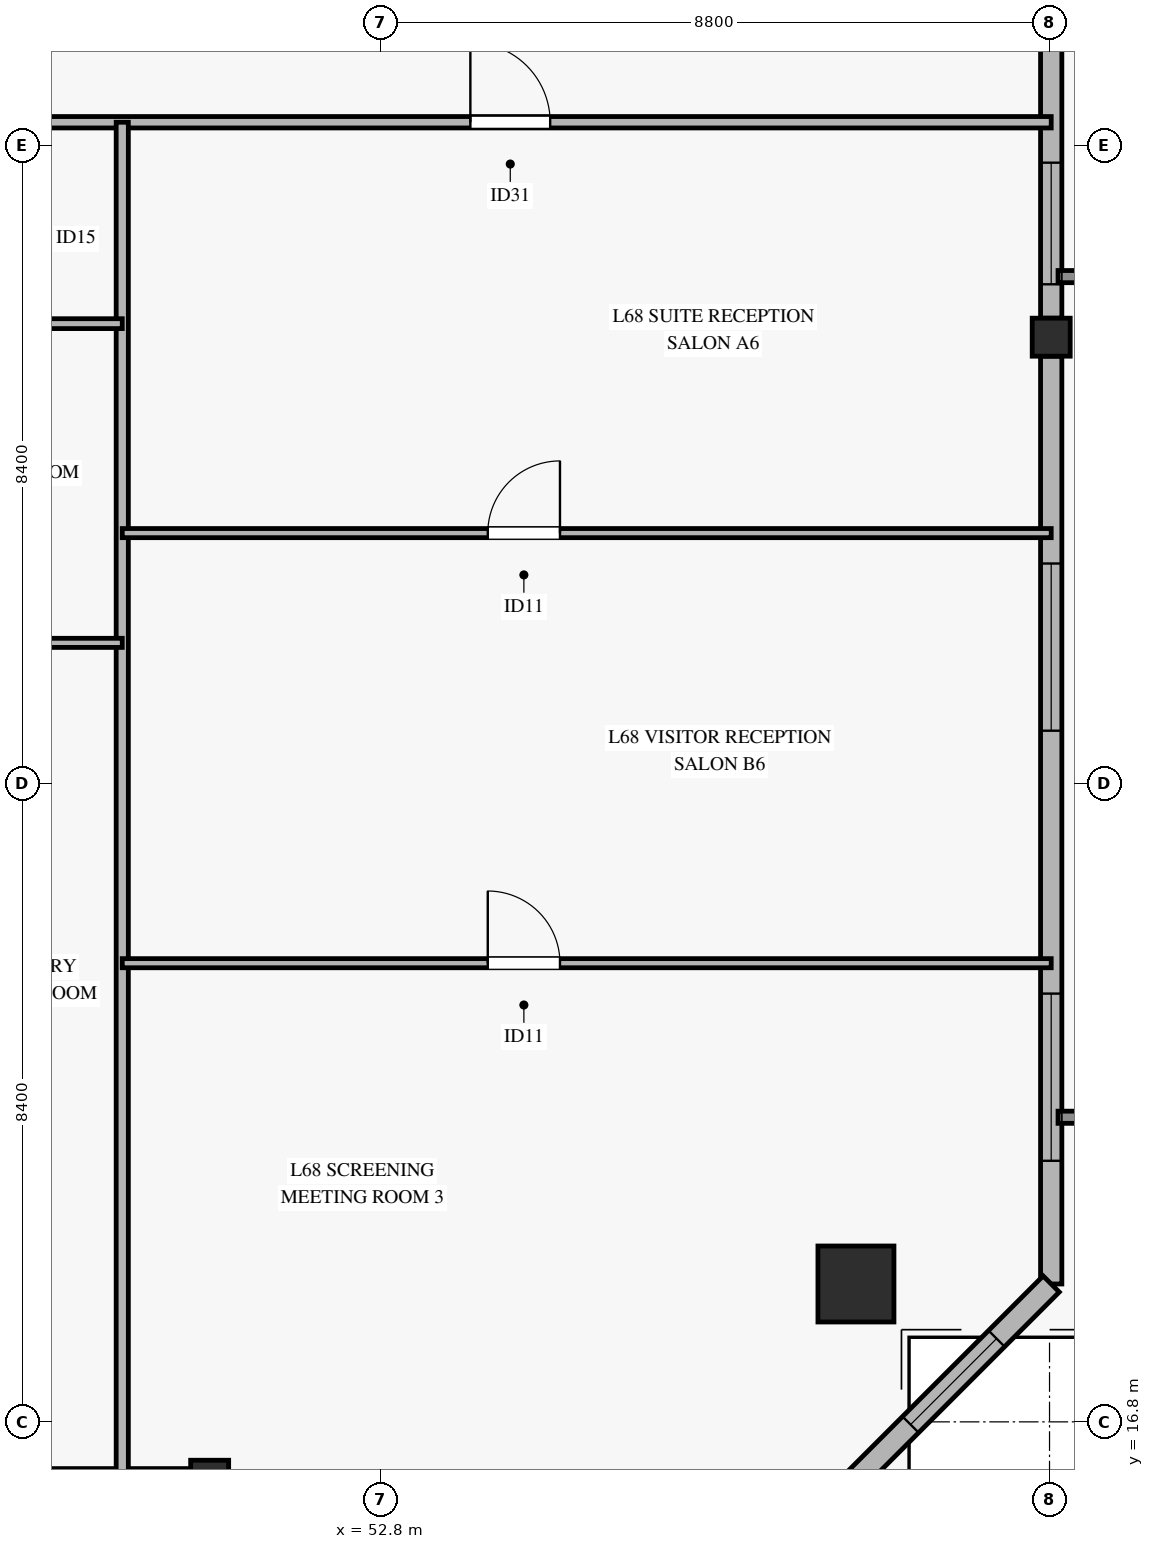
"""IFC4 building model, lengths in metres.
Left out: names, types, materials, properties, quantities, classifications, styles, units other than length and angle.
Written with IfcOpenShell. Run it as: python <this file> out.ifc"""

import sys

from ifc_helpers import new_model, si_unit, direction, frame, frame_2d, origin, origin_2d, place, context, subcontext, project, spatial, rectangle, hollow_rectangle, extrude, source, transform, mapped, element, fill, save


model = new_model("IFC4")
c1 = context("Model", 3, precision=1e-05, world=origin(), true_north=direction((0.0, 1.0)))
c2 = subcontext(c1, "Body", "Model", "MODEL_VIEW")
j1 = project(units=[si_unit("LENGTHUNIT", "METRE"), si_unit("PLANEANGLEUNIT", "RADIAN")], contexts=[c1])
p1 = place(None, origin())
s1 = spatial("IfcSite", under=j1, at=p1, CompositionType="ELEMENT")
p2 = place(p1, origin())
s2 = spatial("IfcBuilding", under=s1, at=p2, CompositionType="ELEMENT")
p3 = place(p2, frame((0.0, 0.0, 265.5)))
s3 = spatial("IfcBuildingStorey", under=s2, at=p3, CompositionType="ELEMENT", Elevation=265.5)
m1 = source(origin(), c2, "Body", "SweptSolid", [
    extrude(hollow_rectangle(XDim=1.0, YDim=1.0, WallThickness=0.045, at=origin_2d()), origin(), (0.0, 0.0, 1.0), 3.326),
])
p4 = place(p3, frame((59.053, 18.614, 0.0), z_axis=(-0.110904687369, 0.266068492199, 0.957552979098), x_axis=(-0.923024180924, -0.384741941345, 0.0)))
e1 = element("IfcColumn", 1, at=p4, inside=s3, PredefinedType="COLUMN", context=c2, shape_type="MappedRepresentation", body=[
    mapped(m1, transform((0.0, 0.0, 0.0), x_axis=(1.0, 0.0, 0.0), y_axis=(0.0, 1.0, 0.0), z_axis=(0.0, 0.0, 1.0), scale=1.0)),
])
m2 = source(origin(), c2, "Body", "SweptSolid", [
    extrude(hollow_rectangle(XDim=0.5, YDim=0.5, WallThickness=0.024, at=origin_2d()), origin(), (0.0, 0.0, 1.0), 3.318),
])
p5 = place(p3, frame((50.55, 16.045, 0.0), z_axis=(0.0, 0.280604531731, 0.959823471672), x_axis=(-1.0, 0.0, 0.0)))
e2 = element("IfcColumn", 2, at=p5, inside=s3, PredefinedType="COLUMN", context=c2, shape_type="MappedRepresentation", body=[
    mapped(m2, transform((0.0, 0.0, 0.0), x_axis=(1.0, 0.0, 0.0), y_axis=(0.0, 1.0, 0.0), z_axis=(0.0, 0.0, 1.0), scale=1.0)),
])
m3 = source(origin(), c2, "Body", "SweptSolid", [
    extrude(hollow_rectangle(XDim=0.5, YDim=0.5, WallThickness=0.024, at=origin_2d()), origin(), (0.0, 0.0, 1.0), 3.246),
])
p6 = place(p3, frame((61.622, 31.072, 0.0), z_axis=(-0.127876528395, 0.143597819239, 0.981339523201), x_axis=(-0.746804669772, -0.665043446104, 0.0)))
e3 = element("IfcColumn", 3, at=p6, inside=s3, PredefinedType="COLUMN", context=c2, shape_type="MappedRepresentation", body=[
    mapped(m3, transform((0.0, 0.0, 0.0), x_axis=(1.0, 0.0, 0.0), y_axis=(0.0, 1.0, 0.0), z_axis=(0.0, 0.0, 1.0), scale=1.0)),
])
p7 = place(p3, frame((44.55, 16.045, 0.0), z_axis=(0.0, 0.0, 1.0), x_axis=(1.0, 0.0, 0.0)))
e4 = element("IfcWall", 4, at=p7, inside=s3, PredefinedType="SOLIDWALL", context=c2, shape_type="SweptSolid", body=[
    extrude(rectangle(XDim=5.75, YDim=0.28, at=frame_2d((2.875, 0.0))), origin(), (0.0, 0.0, 1.0), 2.815),
])
p8 = place(p7, frame((1.95, 0.0, 0.0)))
e5 = element("IfcOpeningElement", 5, at=p8, cuts=e4, PredefinedType="OPENING", context=c2, shape_type="SweptSolid", body=[
    extrude(rectangle(XDim=1.8, YDim=2.25, at=frame_2d((0.9, 1.125))), frame((0.0, 0.15, 0.0), z_axis=(0.0, -1.0, 0.0), x_axis=(1.0, 0.0, 0.0)), (0.0, 0.0, 1.0), 0.3),
])
p9 = place(p3, frame((61.622, 18.614, 0.0), z_axis=(0.0, 0.0, 1.0), x_axis=(0.0, 1.0, 0.0)))
e6 = element("IfcWall", 6, at=p9, inside=s3, PredefinedType="SOLIDWALL", context=c2, shape_type="SweptSolid", body=[
    extrude(rectangle(XDim=12.208, YDim=0.28, at=frame_2d((6.104, 0.0))), origin(), (0.0, 0.0, 1.0), 2.815),
])
p10 = place(p9, frame((1.621, 0.0, 0.45)))
e7 = element("IfcOpeningElement", 7, at=p10, cuts=e6, PredefinedType="OPENING", context=c2, shape_type="SweptSolid", body=[
    extrude(rectangle(XDim=2.2, YDim=2.1, at=frame_2d((1.1, 1.05))), frame((0.0, 0.15, 0.0), z_axis=(0.0, -1.0, 0.0), x_axis=(1.0, 0.0, 0.0)), (0.0, 0.0, 1.0), 0.3),
])
p11 = place(p9, frame((7.28, 0.0, 0.45)))
e8 = element("IfcOpeningElement", 8, at=p11, cuts=e6, PredefinedType="OPENING", context=c2, shape_type="SweptSolid", body=[
    extrude(rectangle(XDim=2.2, YDim=2.1, at=frame_2d((1.1, 1.05))), frame((0.0, 0.15, 0.0), z_axis=(0.0, -1.0, 0.0), x_axis=(1.0, 0.0, 0.0)), (0.0, 0.0, 1.0), 0.3),
])
p12 = place(p3, frame((61.622, 31.322, 0.0), z_axis=(0.0, 0.0, 1.0), x_axis=(0.0, 1.0, 0.0)))
e9 = element("IfcWall", 9, at=p12, inside=s3, PredefinedType="SOLIDWALL", context=c2, shape_type="SweptSolid", body=[
    extrude(rectangle(XDim=12.208, YDim=0.28, at=frame_2d((6.104, 0.0))), origin(), (0.0, 0.0, 1.0), 2.815),
])
p13 = place(p12, frame((0.446, 0.0, 0.45)))
e10 = element("IfcOpeningElement", 10, at=p13, cuts=e9, PredefinedType="OPENING", context=c2, shape_type="SweptSolid", body=[
    extrude(rectangle(XDim=1.6, YDim=2.0, at=frame_2d((0.8, 1.0))), frame((0.0, 0.15, 0.0), z_axis=(0.0, -1.0, 0.0), x_axis=(1.0, 0.0, 0.0)), (0.0, 0.0, 1.0), 0.3),
])
p14 = place(p3, frame((59.053, 16.045, 0.0), z_axis=(0.0, 0.0, 1.0), x_axis=(0.707106781187, 0.707106781187, 0.0)))
e11 = element("IfcWall", 11, at=p14, inside=s3, PredefinedType="SOLIDWALL", context=c2, shape_type="SweptSolid", body=[
    extrude(rectangle(XDim=3.633, YDim=0.3, at=frame_2d((1.817, 0.0))), origin(), (0.0, 0.0, 1.0), 2.815),
])
p15 = place(p14, frame((1.017, 0.0, 0.45)))
e12 = element("IfcOpeningElement", 12, at=p15, cuts=e11, PredefinedType="OPENING", context=c2, shape_type="SweptSolid", body=[
    extrude(rectangle(XDim=1.6, YDim=2.0, at=frame_2d((0.8, 1.0))), frame((0.0, 0.16, 0.0), z_axis=(0.0, -1.0, 0.0), x_axis=(1.0, 0.0, 0.0)), (0.0, 0.0, 1.0), 0.32),
])
p16 = place(p3, frame((8.779, 33.9, 0.0), z_axis=(0.0, 0.0, 1.0), x_axis=(1.0, 0.0, 0.0)))
e13 = element("IfcWall", 13, at=p16, inside=s3, PredefinedType="PARTITIONING", context=c2, shape_type="SweptSolid", body=[
    extrude(rectangle(XDim=52.843, YDim=0.15, at=frame_2d((26.421, 0.0))), origin(), (0.0, 0.0, 1.0), 2.47),
])
p17 = place(p16, frame((6.144, 0.0, 0.0)))
e14 = element("IfcOpeningElement", 14, at=p17, cuts=e13, PredefinedType="OPENING", context=c2, shape_type="SweptSolid", body=[
    extrude(rectangle(XDim=1.05, YDim=2.15, at=frame_2d((0.525, 1.075))), frame((0.0, 0.085, 0.0), z_axis=(0.0, -1.0, 0.0), x_axis=(1.0, 0.0, 0.0)), (0.0, 0.0, 1.0), 0.17),
])
p18 = place(p16, frame((17.646, 0.0, 0.0)))
e15 = element("IfcOpeningElement", 15, at=p18, cuts=e13, PredefinedType="OPENING", context=c2, shape_type="SweptSolid", body=[
    extrude(rectangle(XDim=1.05, YDim=2.15, at=frame_2d((0.525, 1.075))), frame((0.0, 0.085, 0.0), z_axis=(0.0, -1.0, 0.0), x_axis=(1.0, 0.0, 0.0)), (0.0, 0.0, 1.0), 0.17),
])
p19 = place(p16, frame((24.174, 0.0, 0.0)))
e16 = element("IfcOpeningElement", 16, at=p19, cuts=e13, PredefinedType="OPENING", context=c2, shape_type="SweptSolid", body=[
    extrude(rectangle(XDim=1.05, YDim=2.15, at=frame_2d((0.525, 1.075))), frame((0.0, 0.085, 0.0), z_axis=(0.0, -1.0, 0.0), x_axis=(1.0, 0.0, 0.0)), (0.0, 0.0, 1.0), 0.17),
])
p20 = place(p16, frame((31.096, 0.0, 0.0)))
e17 = element("IfcOpeningElement", 17, at=p20, cuts=e13, PredefinedType="OPENING", context=c2, shape_type="SweptSolid", body=[
    extrude(rectangle(XDim=1.05, YDim=2.15, at=frame_2d((0.525, 1.075))), frame((0.0, 0.085, 0.0), z_axis=(0.0, -1.0, 0.0), x_axis=(1.0, 0.0, 0.0)), (0.0, 0.0, 1.0), 0.17),
])
p21 = place(p16, frame((37.241, 0.0, 0.0)))
e18 = element("IfcOpeningElement", 18, at=p21, cuts=e13, PredefinedType="OPENING", context=c2, shape_type="SweptSolid", body=[
    extrude(rectangle(XDim=1.05, YDim=2.15, at=frame_2d((0.525, 1.075))), frame((0.0, 0.085, 0.0), z_axis=(0.0, -1.0, 0.0), x_axis=(1.0, 0.0, 0.0)), (0.0, 0.0, 1.0), 0.17),
])
p22 = place(p16, frame((45.201, 0.0, 0.0)))
e19 = element("IfcOpeningElement", 19, at=p22, cuts=e13, PredefinedType="OPENING", context=c2, shape_type="SweptSolid", body=[
    extrude(rectangle(XDim=1.05, YDim=2.15, at=frame_2d((0.525, 1.075))), frame((0.0, 0.085, 0.0), z_axis=(0.0, -1.0, 0.0), x_axis=(1.0, 0.0, 0.0)), (0.0, 0.0, 1.0), 0.17),
])
p23 = place(p3, frame((49.4, 16.045, 0.0), z_axis=(0.0, 0.0, 1.0), x_axis=(0.0, 1.0, 0.0)))
e20 = element("IfcWall", 20, at=p23, inside=s3, PredefinedType="PARTITIONING", context=c2, shape_type="SweptSolid", body=[
    extrude(rectangle(XDim=17.855, YDim=0.16, at=frame_2d((8.927, 0.0))), origin(), (0.0, 0.0, 1.0), 2.77),
])
p24 = place(p3, frame((47.82, 31.25, 0.0), z_axis=(0.0, 0.0, 1.0), x_axis=(1.0, 0.0, 0.0)))
e21 = element("IfcWall", 21, at=p24, inside=s3, PredefinedType="PARTITIONING", context=c2, shape_type="SweptSolid", body=[
    extrude(rectangle(XDim=1.58, YDim=0.13, at=frame_2d((0.79, 0.0))), origin(), (0.0, 0.0, 1.0), 3.185),
])
p25 = place(p3, frame((45.72, 27.05, 0.0), z_axis=(0.0, 0.0, 1.0), x_axis=(1.0, 0.0, 0.0)))
e22 = element("IfcWall", 22, at=p25, inside=s3, PredefinedType="PARTITIONING", context=c2, shape_type="SweptSolid", body=[
    extrude(rectangle(XDim=3.68, YDim=0.12, at=frame_2d((1.84, 0.0))), origin(), (0.0, 0.0, 1.0), 2.77),
])
p26 = place(p3, frame((49.4, 22.835, 0.0), z_axis=(0.0, 0.0, 1.0), x_axis=(1.0, 0.0, 0.0)))
e23 = element("IfcWall", 23, at=p26, inside=s3, PredefinedType="PARTITIONING", context=c2, shape_type="SweptSolid", body=[
    extrude(rectangle(XDim=12.222, YDim=0.12, at=frame_2d((6.111, 0.0))), origin(), (0.0, 0.0, 1.0), 2.47),
])
p27 = place(p26, frame((4.809, 0.0, 0.0)))
e24 = element("IfcOpeningElement", 24, at=p27, cuts=e23, PredefinedType="OPENING", context=c2, shape_type="SweptSolid", body=[
    extrude(rectangle(XDim=0.95, YDim=2.1, at=frame_2d((0.475, 1.05))), frame((0.0, 0.07, 0.0), z_axis=(0.0, -1.0, 0.0), x_axis=(1.0, 0.0, 0.0)), (0.0, 0.0, 1.0), 0.14),
])
p28 = place(p3, frame((49.4, 28.494, 0.0), z_axis=(0.0, 0.0, 1.0), x_axis=(1.0, 0.0, 0.0)))
e25 = element("IfcWall", 25, at=p28, inside=s3, PredefinedType="PARTITIONING", context=c2, shape_type="SweptSolid", body=[
    extrude(rectangle(XDim=12.222, YDim=0.12, at=frame_2d((6.111, 0.0))), origin(), (0.0, 0.0, 1.0), 2.47),
])
p29 = place(p28, frame((4.809, 0.0, 0.0)))
e26 = element("IfcOpeningElement", 26, at=p29, cuts=e25, PredefinedType="OPENING", context=c2, shape_type="SweptSolid", body=[
    extrude(rectangle(XDim=0.95, YDim=2.1, at=frame_2d((0.475, 1.05))), frame((0.0, 0.07, 0.0), z_axis=(0.0, -1.0, 0.0), x_axis=(1.0, 0.0, 0.0)), (0.0, 0.0, 1.0), 0.14),
])
m4 = source(origin(), c2, "Body", "SweptSolid", [
    extrude(rectangle(XDim=2.2, YDim=2.1, at=frame_2d((1.1, 1.05))), frame((0.0, 0.03, 0.0), z_axis=(0.0, -1.0, 0.0), x_axis=(1.0, 0.0, 0.0)), (0.0, 0.0, 1.0), 0.06),
])
p30 = place(p10, origin())
e27 = element("IfcWindow", 27, at=p30, inside=s3, PartitioningType="SINGLE_PANEL", PredefinedType="WINDOW", context=c2, shape_type="MappedRepresentation", body=[
    mapped(m4, transform((0.0, 0.0, 0.0), x_axis=(1.0, 0.0, 0.0), y_axis=(0.0, 1.0, 0.0), z_axis=(0.0, 0.0, 1.0), scale=1.0)),
])
fill(e7, e27)
p31 = place(p11, origin())
e28 = element("IfcWindow", 28, at=p31, inside=s3, PartitioningType="SINGLE_PANEL", PredefinedType="WINDOW", context=c2, shape_type="MappedRepresentation", body=[
    mapped(m4, transform((0.0, 0.0, 0.0), x_axis=(1.0, 0.0, 0.0), y_axis=(0.0, 1.0, 0.0), z_axis=(0.0, 0.0, 1.0), scale=1.0)),
])
fill(e8, e28)
m5 = source(origin(), c2, "Body", "SweptSolid", [
    extrude(rectangle(XDim=1.6, YDim=2.0, at=frame_2d((0.8, 1.0))), frame((0.0, 0.03, 0.0), z_axis=(0.0, -1.0, 0.0), x_axis=(1.0, 0.0, 0.0)), (0.0, 0.0, 1.0), 0.06),
])
p32 = place(p13, origin())
e29 = element("IfcWindow", 29, at=p32, inside=s3, PartitioningType="SINGLE_PANEL", PredefinedType="WINDOW", context=c2, shape_type="MappedRepresentation", body=[
    mapped(m5, transform((0.0, 0.0, 0.0), x_axis=(1.0, 0.0, 0.0), y_axis=(0.0, 1.0, 0.0), z_axis=(0.0, 0.0, 1.0), scale=1.0)),
])
fill(e10, e29)
p33 = place(p15, origin())
e30 = element("IfcWindow", 30, at=p33, inside=s3, PartitioningType="SINGLE_PANEL", PredefinedType="WINDOW", context=c2, shape_type="MappedRepresentation", body=[
    mapped(m5, transform((0.0, 0.0, 0.0), x_axis=(1.0, 0.0, 0.0), y_axis=(0.0, 1.0, 0.0), z_axis=(0.0, 0.0, 1.0), scale=1.0)),
])
fill(e12, e30)
m6 = source(origin(), c2, "Body", "SweptSolid", [
    extrude(rectangle(XDim=1.05, YDim=2.15, at=frame_2d((0.525, 1.075))), frame((0.0, 0.025, 0.0), z_axis=(0.0, -1.0, 0.0), x_axis=(1.0, 0.0, 0.0)), (0.0, 0.0, 1.0), 0.05),
])
p34 = place(p22, origin())
e31 = element("IfcDoor", 31, at=p34, inside=s3, OperationType="SINGLE_SWING_LEFT", PredefinedType="DOOR", context=c2, shape_type="MappedRepresentation", body=[
    mapped(m6, transform((0.0, 0.0, 0.0), x_axis=(1.0, 0.0, 0.0), y_axis=(0.0, 1.0, 0.0), z_axis=(0.0, 0.0, 1.0), scale=1.0)),
])
fill(e19, e31)
m7 = source(origin(), c2, "Body", "SweptSolid", [
    extrude(rectangle(XDim=0.95, YDim=2.1, at=frame_2d((0.475, 1.05))), frame((0.0, 0.025, 0.0), z_axis=(0.0, -1.0, 0.0), x_axis=(1.0, 0.0, 0.0)), (0.0, 0.0, 1.0), 0.05),
])
p35 = place(p29, origin())
e32 = element("IfcDoor", 32, at=p35, inside=s3, OperationType="SINGLE_SWING_RIGHT", PredefinedType="DOOR", context=c2, shape_type="MappedRepresentation", body=[
    mapped(m7, transform((0.0, 0.0, 0.0), x_axis=(1.0, 0.0, 0.0), y_axis=(0.0, 1.0, 0.0), z_axis=(0.0, 0.0, 1.0), scale=1.0)),
])
fill(e26, e32)
p36 = place(p27, origin())
e33 = element("IfcDoor", 33, at=p36, inside=s3, OperationType="SINGLE_SWING_LEFT", PredefinedType="DOOR", context=c2, shape_type="MappedRepresentation", body=[
    mapped(m7, transform((0.0, 0.0, 0.0), x_axis=(1.0, 0.0, 0.0), y_axis=(0.0, 1.0, 0.0), z_axis=(0.0, 0.0, 1.0), scale=1.0)),
])
fill(e24, e33)
save(model, sys.argv[1])
